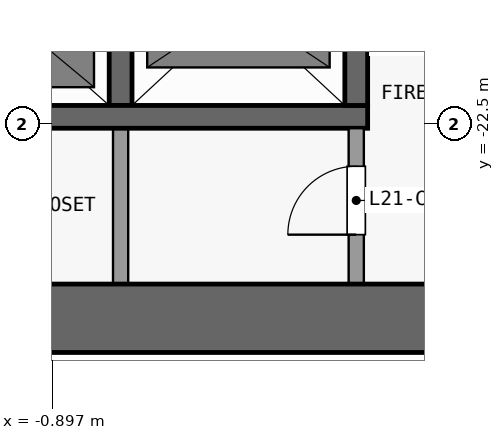
"""IFC4 building model, lengths in metres.
Left out: names, types, materials, properties, quantities, classifications, styles, units other than length and angle.
Written with IfcOpenShell. Run it as: python <this file> out.ifc"""

import sys

from ifc_helpers import new_model, si_unit, direction, frame, frame_2d, origin, place, context, subcontext, project, spatial, rectangle, extrude, element, fill, save


model = new_model("IFC4")
c1 = context("Model", 3, precision=1e-05, world=origin(), true_north=direction((0.0, 1.0)))
c2 = subcontext(c1, "Body", "Model", "MODEL_VIEW")
j1 = project(units=[si_unit("LENGTHUNIT", "METRE"), si_unit("PLANEANGLEUNIT", "RADIAN")], contexts=[c1])
p1 = place(None, origin())
s1 = spatial("IfcSite", under=j1, at=p1, CompositionType="ELEMENT")
p2 = place(p1, origin())
s2 = spatial("IfcBuilding", under=s1, at=p2, CompositionType="ELEMENT")
p3 = place(p2, frame((0.0, 0.0, 88.3)))
s3 = spatial("IfcBuildingStorey", under=s2, at=p3, CompositionType="ELEMENT", Elevation=88.3)
p4 = place(p3, frame((-13.4, -25.05, 0.0), z_axis=(0.0, 0.0, 1.0), x_axis=(1.0, 0.0, 0.0)))
e1 = element("IfcWall", 1, at=p4, inside=s3, PredefinedType="SHEAR", context=c2, shape_type="SweptSolid", body=[
    extrude(rectangle(XDim=26.8, YDim=0.9, at=frame_2d((13.4, 0.0))), origin(), (0.0, 0.0, 1.0), 3.3),
])
p5 = place(p3, frame((-2.95, -22.4, 0.0), z_axis=(0.0, 0.0, 1.0), x_axis=(1.0, 0.0, 0.0)))
e2 = element("IfcWall", 2, at=p5, inside=s3, PredefinedType="SHEAR", context=c2, shape_type="SweptSolid", body=[
    extrude(rectangle(XDim=6.2, YDim=0.3, at=frame_2d((3.1, 0.0))), origin(), (0.0, 0.0, 1.0), 3.3),
])
p6 = place(p3, frame((0.0, -24.6, 0.0), z_axis=(0.0, 0.0, 1.0), x_axis=(0.0, 1.0, 0.0)))
e3 = element("IfcWall", 3, at=p6, inside=s3, PredefinedType="PARTITIONING", context=c2, shape_type="SweptSolid", body=[
    extrude(rectangle(XDim=2.05, YDim=0.2, at=frame_2d((1.025, 0.0))), origin(), (0.0, 0.0, 1.0), 3.3),
])
p7 = place(p3, frame((0.0, -22.25, 0.0), z_axis=(0.0, 0.0, 1.0), x_axis=(0.0, 1.0, 0.0)))
e4 = element("IfcWall", 4, at=p7, inside=s3, PredefinedType="SHEAR", context=c2, shape_type="SweptSolid", body=[
    extrude(rectangle(XDim=13.75, YDim=0.3, at=frame_2d((6.875, 0.0))), origin(), (0.0, 0.0, 1.0), 3.3),
])
p8 = place(p3, frame((3.1, -24.6, 0.0), z_axis=(0.0, 0.0, 1.0), x_axis=(0.0, 1.0, 0.0)))
e5 = element("IfcWall", 5, at=p8, inside=s3, PredefinedType="PARTITIONING", context=c2, shape_type="SweptSolid", body=[
    extrude(rectangle(XDim=2.05, YDim=0.2, at=frame_2d((1.025, 0.0))), origin(), (0.0, 0.0, 1.0), 3.3),
])
p9 = place(p8, frame((0.65, 0.0, 0.0)))
e6 = element("IfcOpeningElement", 6, at=p9, cuts=e5, PredefinedType="OPENING", context=c2, shape_type="SweptSolid", body=[
    extrude(rectangle(XDim=0.9, YDim=2.1, at=frame_2d((0.45, 1.05))), frame((0.0, 0.11, 0.0), z_axis=(0.0, -1.0, 0.0), x_axis=(1.0, 0.0, 0.0)), (0.0, 0.0, 1.0), 0.22),
])
p10 = place(p3, frame((3.1, -22.25, 0.0), z_axis=(0.0, 0.0, 1.0), x_axis=(0.0, 1.0, 0.0)))
e7 = element("IfcWall", 7, at=p10, inside=s3, PredefinedType="SHEAR", context=c2, shape_type="SweptSolid", body=[
    extrude(rectangle(XDim=2.85, YDim=0.3, at=frame_2d((1.425, 0.0))), origin(), (0.0, 0.0, 1.0), 3.3),
])
p11 = place(p10, frame((0.75, 0.0, 0.0)))
e8 = element("IfcOpeningElement", 8, at=p11, cuts=e7, PredefinedType="OPENING", context=c2, shape_type="SweptSolid", body=[
    extrude(rectangle(XDim=1.1, YDim=2.1, at=frame_2d((0.55, 1.05))), frame((0.0, 0.16, 0.0), z_axis=(0.0, -1.0, 0.0), x_axis=(1.0, 0.0, 0.0)), (0.0, 0.0, 1.0), 0.32),
])
p12 = place(p9, origin())
e9 = element("IfcDoor", 9, at=p12, inside=s3, OperationType="SINGLE_SWING_LEFT", PredefinedType="DOOR", context=c2, shape_type="SweptSolid", body=[
    extrude(rectangle(XDim=0.9, YDim=2.1, at=frame_2d((0.45, 1.05))), frame((0.0, 0.025, 0.0), z_axis=(0.0, -1.0, 0.0), x_axis=(1.0, 0.0, 0.0)), (0.0, 0.0, 1.0), 0.05),
])
fill(e6, e9)
save(model, sys.argv[1])
